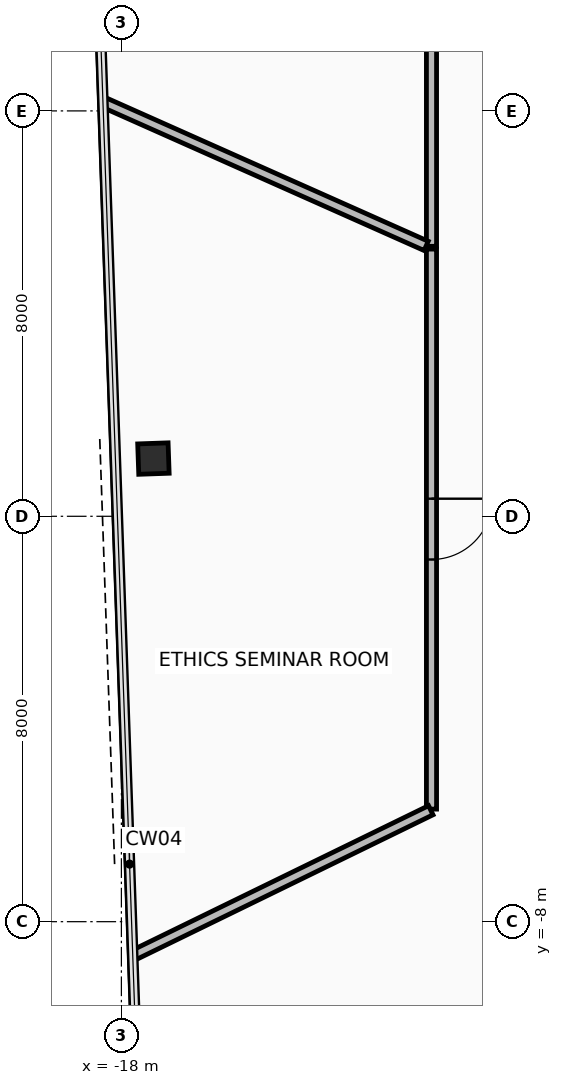
"""IFC4 building model, lengths in metres.
Left out: names, types, materials, properties, quantities, classifications, styles, units other than length and angle.
Written with IfcOpenShell. Run it as: python <this file> out.ifc"""

import sys

from ifc_helpers import new_model, si_unit, direction, frame, frame_2d, origin, origin_2d, place, context, subcontext, project, spatial, rectangle, hollow_rectangle, extrude, element, fill, save


model = new_model("IFC4")
c1 = context("Model", 3, precision=1e-05, world=origin(), true_north=direction((0.0, 1.0)))
c2 = subcontext(c1, "Body", "Model", "MODEL_VIEW")
j1 = project(units=[si_unit("LENGTHUNIT", "METRE"), si_unit("PLANEANGLEUNIT", "RADIAN")], contexts=[c1])
p1 = place(None, origin())
s1 = spatial("IfcSite", under=j1, at=p1, CompositionType="ELEMENT")
p2 = place(p1, origin())
s2 = spatial("IfcBuilding", under=s1, at=p2, CompositionType="ELEMENT")
p3 = place(p2, frame((0.0, 0.0, 142.4)))
s3 = spatial("IfcBuildingStorey", under=s2, at=p3, CompositionType="ELEMENT", Elevation=142.4)
p4 = place(p3, frame((-17.368, 1.139, 0.0), z_axis=(0.0, 0.0, 1.0), x_axis=(-0.034899496703, 0.999390827019, 0.0)))
e1 = element("IfcColumn", 1, at=p4, inside=s3, PredefinedType="COLUMN", context=c2, shape_type="SweptSolid", body=[
    extrude(hollow_rectangle(XDim=0.6, YDim=0.6, WallThickness=0.036, at=origin_2d()), origin(), (0.0, 0.0, 1.0), 3.6),
])
p5 = place(p3, frame((-11.88, 10.579, 0.0), z_axis=(0.0, 0.0, 1.0), x_axis=(0.0, -1.0, 0.0)))
e2 = element("IfcWall", 2, at=p5, inside=s3, PredefinedType="PARTITIONING", context=c2, shape_type="SweptSolid", body=[
    extrude(rectangle(XDim=5.251, YDim=0.2, at=frame_2d((2.626, 0.0))), origin(), (0.0, 0.0, 1.0), 2.855),
])
p6 = place(p3, frame((-11.985, 5.336, 0.0), z_axis=(0.0, 0.0, 1.0), x_axis=(-0.913541116326, 0.406746393693, 0.0)))
e3 = element("IfcWall", 3, at=p6, inside=s3, PredefinedType="PARTITIONING", context=c2, shape_type="SweptSolid", body=[
    extrude(rectangle(XDim=6.967, YDim=0.2, at=frame_2d((3.483, 0.0))), origin(), (0.0, 0.0, 1.0), 2.705),
])
p7 = place(p3, frame((-11.88, 5.273, 0.0), z_axis=(0.0, 0.0, 1.0), x_axis=(0.0, -1.0, 0.0)))
e4 = element("IfcWall", 4, at=p7, inside=s3, PredefinedType="PARTITIONING", context=c2, shape_type="SweptSolid", body=[
    extrude(rectangle(XDim=11.052, YDim=0.2, at=frame_2d((5.526, 0.0))), origin(), (0.0, 0.0, 1.0), 2.855),
])
p8 = place(p7, frame((4.926, 0.0, 0.0)))
e5 = element("IfcOpeningElement", 5, at=p8, cuts=e4, PredefinedType="OPENING", context=c2, shape_type="SweptSolid", body=[
    extrude(rectangle(XDim=1.2, YDim=2.15, at=frame_2d((0.6, 1.075))), frame((0.0, 0.11, 0.0), z_axis=(0.0, -1.0, 0.0), x_axis=(1.0, 0.0, 0.0)), (0.0, 0.0, 1.0), 0.22),
])
p9 = place(p3, frame((-11.894, -5.801, 0.0), z_axis=(0.0, 0.0, 1.0), x_axis=(-0.89877884349, -0.438402315796, 0.0)))
e6 = element("IfcWall", 6, at=p9, inside=s3, PredefinedType="PARTITIONING", context=c2, shape_type="SweptSolid", body=[
    extrude(rectangle(XDim=6.544, YDim=0.2, at=frame_2d((3.272, 0.0))), origin(), (0.0, 0.0, 1.0), 2.705),
])
p10 = place(p8, origin())
e7 = element("IfcDoor", 7, at=p10, inside=s3, OperationType="SINGLE_SWING_LEFT", PredefinedType="DOOR", context=c2, shape_type="SweptSolid", body=[
    extrude(rectangle(XDim=1.2, YDim=2.15, at=frame_2d((0.6, 1.075))), frame((0.0, 0.025, 0.0), z_axis=(0.0, -1.0, 0.0), x_axis=(1.0, 0.0, 0.0)), (0.0, 0.0, 1.0), 0.05),
])
fill(e5, e7)
save(model, sys.argv[1])
